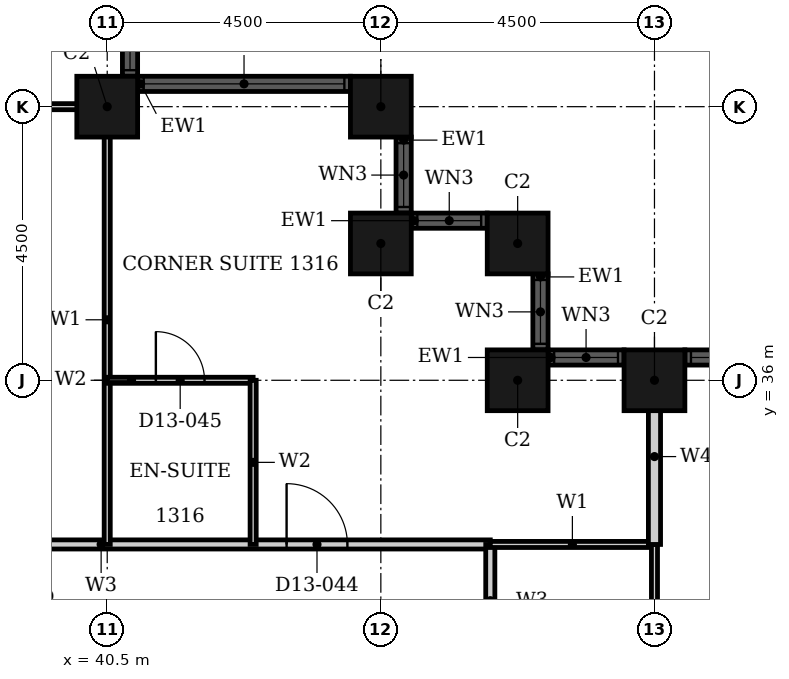
"""IFC4 building model, lengths in metres.
Left out: names, types, materials, properties, quantities, classifications, styles, units other than length and angle.
Written with IfcOpenShell. Run it as: python <this file> out.ifc"""

import sys

from ifc_helpers import new_model, si_unit, direction, frame, frame_2d, origin, origin_2d, place, context, subcontext, project, spatial, rectangle, hollow_rectangle, extrude, element, fill, save


model = new_model("IFC4")
c1 = context("Model", 3, precision=1e-05, world=origin(), true_north=direction((0.0, 1.0)))
c2 = subcontext(c1, "Body", "Model", "MODEL_VIEW")
j1 = project(units=[si_unit("LENGTHUNIT", "METRE"), si_unit("PLANEANGLEUNIT", "RADIAN")], contexts=[c1])
p1 = place(None, origin())
s1 = spatial("IfcSite", under=j1, at=p1, CompositionType="ELEMENT")
p2 = place(p1, origin())
s2 = spatial("IfcBuilding", under=s1, at=p2, CompositionType="ELEMENT")
p3 = place(p2, frame((0.0, 0.0, 60.0)))
s3 = spatial("IfcBuildingStorey", under=s2, at=p3, CompositionType="ELEMENT", Elevation=60.0)
for number, where, z_axis, x_axis in (
    (1, (49.5, 36.0, 0.0), (0.0, 0.0, 1.0), (1.0, 0.0, 0.0)),
    (2, (47.25, 36.0, 0.0), (0.0, 0.0, 1.0), (1.0, 0.0, 0.0)),
    (3, (47.25, 38.25, 0.0), (0.0, 0.0, 1.0), (1.0, 0.0, 0.0)),
    (4, (45.0, 38.25, 0.0), (0.0, 0.0, 1.0), (1.0, 0.0, 0.0)),
    (5, (45.0, 40.5, 0.0), (0.0, 0.0, 1.0), (1.0, 0.0, 0.0)),
    (6, (40.5, 40.5, 0.0), (0.0, 0.0, 1.0), (1.0, 0.0, 0.0)),
):
    element("IfcColumn", number, at=place(p3, frame(where, z_axis=z_axis, x_axis=x_axis)), inside=s3, PredefinedType="COLUMN", context=c2, shape_type="SweptSolid", body=[
        extrude(hollow_rectangle(XDim=1.0, YDim=1.0, WallThickness=0.032, at=origin_2d()), origin(), (0.0, 0.0, 1.0), 3.6),
    ])
p4 = place(p3, frame((58.0, 36.375, 0.0), z_axis=(0.0, 0.0, 1.0), x_axis=(-1.0, 0.0, 0.0)))
e7 = element("IfcWall", 7, at=p4, inside=s3, PredefinedType="SOLIDWALL", context=c2, shape_type="SweptSolid", body=[
    extrude(rectangle(XDim=8.0, YDim=0.25, at=frame_2d((4.0, 0.0))), origin(), (0.0, 0.0, 1.0), 3.6),
])
p5 = place(p4, frame((0.1, 0.0, 0.9)))
e8 = element("IfcOpeningElement", 8, at=p5, cuts=e7, PredefinedType="OPENING", context=c2, shape_type="SweptSolid", body=[
    extrude(rectangle(XDim=3.3, YDim=2.08, at=frame_2d((1.65, 1.04))), frame((0.0, 0.135, 0.0), z_axis=(0.0, -1.0, 0.0), x_axis=(1.0, 0.0, 0.0)), (0.0, 0.0, 1.0), 0.27),
])
p6 = place(p4, frame((4.6, 0.0, 0.9)))
e9 = element("IfcOpeningElement", 9, at=p6, cuts=e7, PredefinedType="OPENING", context=c2, shape_type="SweptSolid", body=[
    extrude(rectangle(XDim=3.3, YDim=2.08, at=frame_2d((1.65, 1.04))), frame((0.0, 0.135, 0.0), z_axis=(0.0, -1.0, 0.0), x_axis=(1.0, 0.0, 0.0)), (0.0, 0.0, 1.0), 0.27),
])
p7 = place(p3, frame((49.0, 36.375, 0.0), z_axis=(0.0, 0.0, 1.0), x_axis=(-1.0, 0.0, 0.0)))
e10 = element("IfcWall", 10, at=p7, inside=s3, PredefinedType="SOLIDWALL", context=c2, shape_type="SweptSolid", body=[
    extrude(rectangle(XDim=1.25, YDim=0.25, at=frame_2d((0.625, 0.0))), origin(), (0.0, 0.0, 1.0), 3.6),
])
p8 = place(p7, frame((0.1, 0.0, 0.9)))
e11 = element("IfcOpeningElement", 11, at=p8, cuts=e10, PredefinedType="OPENING", context=c2, shape_type="SweptSolid", body=[
    extrude(rectangle(XDim=1.05, YDim=2.08, at=frame_2d((0.525, 1.04))), frame((0.0, 0.135, 0.0), z_axis=(0.0, -1.0, 0.0), x_axis=(1.0, 0.0, 0.0)), (0.0, 0.0, 1.0), 0.27),
])
p9 = place(p3, frame((47.625, 36.5, 0.0), z_axis=(0.0, 0.0, 1.0), x_axis=(0.0, 1.0, 0.0)))
e12 = element("IfcWall", 12, at=p9, inside=s3, PredefinedType="SOLIDWALL", context=c2, shape_type="SweptSolid", body=[
    extrude(rectangle(XDim=1.25, YDim=0.25, at=frame_2d((0.625, 0.0))), origin(), (0.0, 0.0, 1.0), 3.6),
])
p10 = place(p9, frame((0.1, 0.0, 0.9)))
e13 = element("IfcOpeningElement", 13, at=p10, cuts=e12, PredefinedType="OPENING", context=c2, shape_type="SweptSolid", body=[
    extrude(rectangle(XDim=1.05, YDim=2.08, at=frame_2d((0.525, 1.04))), frame((0.0, 0.135, 0.0), z_axis=(0.0, -1.0, 0.0), x_axis=(1.0, 0.0, 0.0)), (0.0, 0.0, 1.0), 0.27),
])
p11 = place(p3, frame((46.75, 38.625, 0.0), z_axis=(0.0, 0.0, 1.0), x_axis=(-1.0, 0.0, 0.0)))
e14 = element("IfcWall", 14, at=p11, inside=s3, PredefinedType="SOLIDWALL", context=c2, shape_type="SweptSolid", body=[
    extrude(rectangle(XDim=1.25, YDim=0.25, at=frame_2d((0.625, 0.0))), origin(), (0.0, 0.0, 1.0), 3.6),
])
p12 = place(p11, frame((0.1, 0.0, 0.9)))
e15 = element("IfcOpeningElement", 15, at=p12, cuts=e14, PredefinedType="OPENING", context=c2, shape_type="SweptSolid", body=[
    extrude(rectangle(XDim=1.05, YDim=2.08, at=frame_2d((0.525, 1.04))), frame((0.0, 0.135, 0.0), z_axis=(0.0, -1.0, 0.0), x_axis=(1.0, 0.0, 0.0)), (0.0, 0.0, 1.0), 0.27),
])
p13 = place(p3, frame((45.375, 38.75, 0.0), z_axis=(0.0, 0.0, 1.0), x_axis=(0.0, 1.0, 0.0)))
e16 = element("IfcWall", 16, at=p13, inside=s3, PredefinedType="SOLIDWALL", context=c2, shape_type="SweptSolid", body=[
    extrude(rectangle(XDim=1.25, YDim=0.25, at=frame_2d((0.625, 0.0))), origin(), (0.0, 0.0, 1.0), 3.6),
])
p14 = place(p13, frame((0.1, 0.0, 0.9)))
e17 = element("IfcOpeningElement", 17, at=p14, cuts=e16, PredefinedType="OPENING", context=c2, shape_type="SweptSolid", body=[
    extrude(rectangle(XDim=1.05, YDim=2.08, at=frame_2d((0.525, 1.04))), frame((0.0, 0.135, 0.0), z_axis=(0.0, -1.0, 0.0), x_axis=(1.0, 0.0, 0.0)), (0.0, 0.0, 1.0), 0.27),
])
p15 = place(p3, frame((44.5, 40.875, 0.0), z_axis=(0.0, 0.0, 1.0), x_axis=(-1.0, 0.0, 0.0)))
e18 = element("IfcWall", 18, at=p15, inside=s3, PredefinedType="SOLIDWALL", context=c2, shape_type="SweptSolid", body=[
    extrude(rectangle(XDim=3.5, YDim=0.25, at=frame_2d((1.75, 0.0))), origin(), (0.0, 0.0, 1.0), 3.6),
])
p16 = place(p15, frame((0.1, 0.0, 0.9)))
e19 = element("IfcOpeningElement", 19, at=p16, cuts=e18, PredefinedType="OPENING", context=c2, shape_type="SweptSolid", body=[
    extrude(rectangle(XDim=3.3, YDim=2.08, at=frame_2d((1.65, 1.04))), frame((0.0, 0.135, 0.0), z_axis=(0.0, -1.0, 0.0), x_axis=(1.0, 0.0, 0.0)), (0.0, 0.0, 1.0), 0.27),
])
p17 = place(p3, frame((40.875, 41.0, 0.0), z_axis=(0.0, 0.0, 1.0), x_axis=(0.0, 1.0, 0.0)))
e20 = element("IfcWall", 20, at=p17, inside=s3, PredefinedType="SOLIDWALL", context=c2, shape_type="SweptSolid", body=[
    extrude(rectangle(XDim=8.0, YDim=0.25, at=frame_2d((4.0, 0.0))), origin(), (0.0, 0.0, 1.0), 3.6),
])
p18 = place(p17, frame((0.1, 0.0, 0.9)))
e21 = element("IfcOpeningElement", 21, at=p18, cuts=e20, PredefinedType="OPENING", context=c2, shape_type="SweptSolid", body=[
    extrude(rectangle(XDim=3.3, YDim=2.08, at=frame_2d((1.65, 1.04))), frame((0.0, 0.135, 0.0), z_axis=(0.0, -1.0, 0.0), x_axis=(1.0, 0.0, 0.0)), (0.0, 0.0, 1.0), 0.27),
])
p19 = place(p17, frame((4.6, 0.0, 0.9)))
e22 = element("IfcOpeningElement", 22, at=p19, cuts=e20, PredefinedType="OPENING", context=c2, shape_type="SweptSolid", body=[
    extrude(rectangle(XDim=3.3, YDim=2.08, at=frame_2d((1.65, 1.04))), frame((0.0, 0.135, 0.0), z_axis=(0.0, -1.0, 0.0), x_axis=(1.0, 0.0, 0.0)), (0.0, 0.0, 1.0), 0.27),
])
p20 = place(p3, frame((33.3, 33.3, 0.0), z_axis=(0.0, 0.0, 1.0), x_axis=(1.0, 0.0, 0.0)))
e23 = element("IfcWall", 23, at=p20, inside=s3, PredefinedType="PARTITIONING", context=c2, shape_type="SweptSolid", body=[
    extrude(rectangle(XDim=13.5, YDim=0.15, at=frame_2d((6.75, 0.0))), origin(), (0.0, 0.0, 1.0), 3.3),
])
p21 = place(p20, frame((10.15, 0.0, 0.0)))
e24 = element("IfcOpeningElement", 24, at=p21, cuts=e23, PredefinedType="OPENING", context=c2, shape_type="SweptSolid", body=[
    extrude(rectangle(XDim=1.0, YDim=2.1, at=frame_2d((0.5, 1.05))), frame((0.0, 0.085, 0.0), z_axis=(0.0, -1.0, 0.0), x_axis=(1.0, 0.0, 0.0)), (0.0, 0.0, 1.0), 0.17),
])
p22 = place(p20, frame((3.15, 0.0, 0.0)))
e25 = element("IfcOpeningElement", 25, at=p22, cuts=e23, PredefinedType="OPENING", context=c2, shape_type="SweptSolid", body=[
    extrude(rectangle(XDim=0.9, YDim=2.1, at=frame_2d((0.45, 1.05))), frame((0.0, 0.085, 0.0), z_axis=(0.0, -1.0, 0.0), x_axis=(1.0, 0.0, 0.0)), (0.0, 0.0, 1.0), 0.17),
])
p23 = place(p3, frame((46.8, 28.8, 0.0), z_axis=(0.0, 0.0, 1.0), x_axis=(0.0, 1.0, 0.0)))
e26 = element("IfcWall", 26, at=p23, inside=s3, PredefinedType="PARTITIONING", context=c2, shape_type="SweptSolid", body=[
    extrude(rectangle(XDim=4.5, YDim=0.15, at=frame_2d((2.25, 0.0))), origin(), (0.0, 0.0, 1.0), 3.3),
])
p24 = place(p23, frame((1.75, 0.0, 0.0)))
e27 = element("IfcOpeningElement", 27, at=p24, cuts=e26, PredefinedType="OPENING", context=c2, shape_type="SweptSolid", body=[
    extrude(rectangle(XDim=0.9, YDim=2.1, at=frame_2d((0.45, 1.05))), frame((0.0, 0.085, 0.0), z_axis=(0.0, -1.0, 0.0), x_axis=(1.0, 0.0, 0.0)), (0.0, 0.0, 1.0), 0.17),
])
p25 = place(p3, frame((46.8, 33.3, 0.0), z_axis=(0.0, 0.0, 1.0), x_axis=(1.0, 0.0, 0.0)))
e28 = element("IfcWall", 28, at=p25, inside=s3, PredefinedType="PARTITIONING", context=c2, shape_type="SweptSolid", body=[
    extrude(rectangle(XDim=2.7, YDim=0.1, at=frame_2d((1.35, 0.0))), origin(), (0.0, 0.0, 1.0), 3.3),
])
p26 = place(p3, frame((33.3, 40.5, 0.0), z_axis=(0.0, 0.0, 1.0), x_axis=(1.0, 0.0, 0.0)))
e29 = element("IfcWall", 29, at=p26, inside=s3, PredefinedType="PARTITIONING", context=c2, shape_type="SweptSolid", body=[
    extrude(rectangle(XDim=7.39, YDim=0.1, at=frame_2d((3.695, 0.0))), origin(), (0.0, 0.0, 1.0), 2.38),
])
p27 = place(p3, frame((40.5, 33.3, 0.0), z_axis=(0.0, 0.0, 1.0), x_axis=(0.0, 1.0, 0.0)))
e30 = element("IfcWall", 30, at=p27, inside=s3, PredefinedType="PARTITIONING", context=c2, shape_type="SweptSolid", body=[
    extrude(rectangle(XDim=7.39, YDim=0.1, at=frame_2d((3.695, 0.0))), origin(), (0.0, 0.0, 1.0), 3.3),
])
p28 = place(p3, frame((49.5, 28.8, 0.0), z_axis=(0.0, 0.0, 1.0), x_axis=(0.0, 1.0, 0.0)))
e31 = element("IfcWall", 31, at=p28, inside=s3, PredefinedType="PARTITIONING", context=c2, shape_type="SweptSolid", body=[
    extrude(rectangle(XDim=4.5, YDim=0.1, at=frame_2d((2.25, 0.0))), origin(), (0.0, 0.0, 1.0), 2.38),
])
p29 = place(p3, frame((49.5, 33.3, 0.0), z_axis=(0.0, 0.0, 1.0), x_axis=(0.0, 1.0, 0.0)))
e32 = element("IfcWall", 32, at=p29, inside=s3, PredefinedType="PARTITIONING", context=c2, shape_type="SweptSolid", body=[
    extrude(rectangle(XDim=2.89, YDim=0.2, at=frame_2d((1.445, 0.0))), origin(), (0.0, 0.0, 1.0), 2.38),
])
p30 = place(p3, frame((40.5, 36.0, 0.0), z_axis=(0.0, 0.0, 1.0), x_axis=(1.0, 0.0, 0.0)))
e33 = element("IfcWall", 33, at=p30, inside=s3, PredefinedType="PARTITIONING", context=c2, shape_type="SweptSolid", body=[
    extrude(rectangle(XDim=2.4, YDim=0.1, at=frame_2d((1.2, 0.0))), origin(), (0.0, 0.0, 1.0), 3.3),
])
p31 = place(p30, frame((0.8, 0.0, 0.0)))
e34 = element("IfcOpeningElement", 34, at=p31, cuts=e33, PredefinedType="OPENING", context=c2, shape_type="SweptSolid", body=[
    extrude(rectangle(XDim=0.8, YDim=2.1, at=frame_2d((0.4, 1.05))), frame((0.0, 0.06, 0.0), z_axis=(0.0, -1.0, 0.0), x_axis=(1.0, 0.0, 0.0)), (0.0, 0.0, 1.0), 0.12),
])
p32 = place(p3, frame((42.9, 33.3, 0.0), z_axis=(0.0, 0.0, 1.0), x_axis=(0.0, 1.0, 0.0)))
e35 = element("IfcWall", 35, at=p32, inside=s3, PredefinedType="PARTITIONING", context=c2, shape_type="SweptSolid", body=[
    extrude(rectangle(XDim=2.7, YDim=0.1, at=frame_2d((1.35, 0.0))), origin(), (0.0, 0.0, 1.0), 3.3),
])
p33 = place(p6, origin())
e36 = element("IfcWindow", 36, at=p33, inside=s3, PartitioningType="SINGLE_PANEL", PredefinedType="WINDOW", context=c2, shape_type="SweptSolid", body=[
    extrude(rectangle(XDim=3.3, YDim=2.08, at=frame_2d((1.65, 1.04))), frame((0.0, 0.03, 0.0), z_axis=(0.0, -1.0, 0.0), x_axis=(1.0, 0.0, 0.0)), (0.0, 0.0, 1.0), 0.06),
])
fill(e9, e36)
p34 = place(p8, origin())
e37 = element("IfcWindow", 37, at=p34, inside=s3, PartitioningType="SINGLE_PANEL", PredefinedType="WINDOW", context=c2, shape_type="SweptSolid", body=[
    extrude(rectangle(XDim=1.05, YDim=2.08, at=frame_2d((0.525, 1.04))), frame((0.0, 0.03, 0.0), z_axis=(0.0, -1.0, 0.0), x_axis=(1.0, 0.0, 0.0)), (0.0, 0.0, 1.0), 0.06),
])
fill(e11, e37)
p35 = place(p10, origin())
e38 = element("IfcWindow", 38, at=p35, inside=s3, PartitioningType="SINGLE_PANEL", PredefinedType="WINDOW", context=c2, shape_type="SweptSolid", body=[
    extrude(rectangle(XDim=1.05, YDim=2.08, at=frame_2d((0.525, 1.04))), frame((0.0, 0.03, 0.0), z_axis=(0.0, -1.0, 0.0), x_axis=(1.0, 0.0, 0.0)), (0.0, 0.0, 1.0), 0.06),
])
fill(e13, e38)
p36 = place(p12, origin())
e39 = element("IfcWindow", 39, at=p36, inside=s3, PartitioningType="SINGLE_PANEL", PredefinedType="WINDOW", context=c2, shape_type="SweptSolid", body=[
    extrude(rectangle(XDim=1.05, YDim=2.08, at=frame_2d((0.525, 1.04))), frame((0.0, 0.03, 0.0), z_axis=(0.0, -1.0, 0.0), x_axis=(1.0, 0.0, 0.0)), (0.0, 0.0, 1.0), 0.06),
])
fill(e15, e39)
p37 = place(p14, origin())
e40 = element("IfcWindow", 40, at=p37, inside=s3, PartitioningType="SINGLE_PANEL", PredefinedType="WINDOW", context=c2, shape_type="SweptSolid", body=[
    extrude(rectangle(XDim=1.05, YDim=2.08, at=frame_2d((0.525, 1.04))), frame((0.0, 0.03, 0.0), z_axis=(0.0, -1.0, 0.0), x_axis=(1.0, 0.0, 0.0)), (0.0, 0.0, 1.0), 0.06),
])
fill(e17, e40)
p38 = place(p16, origin())
e41 = element("IfcWindow", 41, at=p38, inside=s3, PartitioningType="SINGLE_PANEL", PredefinedType="WINDOW", context=c2, shape_type="SweptSolid", body=[
    extrude(rectangle(XDim=3.3, YDim=2.08, at=frame_2d((1.65, 1.04))), frame((0.0, 0.03, 0.0), z_axis=(0.0, -1.0, 0.0), x_axis=(1.0, 0.0, 0.0)), (0.0, 0.0, 1.0), 0.06),
])
fill(e19, e41)
p39 = place(p18, origin())
e42 = element("IfcWindow", 42, at=p39, inside=s3, PartitioningType="SINGLE_PANEL", PredefinedType="WINDOW", context=c2, shape_type="SweptSolid", body=[
    extrude(rectangle(XDim=3.3, YDim=2.08, at=frame_2d((1.65, 1.04))), frame((0.0, 0.03, 0.0), z_axis=(0.0, -1.0, 0.0), x_axis=(1.0, 0.0, 0.0)), (0.0, 0.0, 1.0), 0.06),
])
fill(e21, e42)
p40 = place(p21, origin())
e43 = element("IfcDoor", 43, at=p40, inside=s3, OperationType="SINGLE_SWING_RIGHT", PredefinedType="DOOR", context=c2, shape_type="SweptSolid", body=[
    extrude(rectangle(XDim=1.0, YDim=2.1, at=frame_2d((0.5, 1.05))), frame((0.0, 0.025, 0.0), z_axis=(0.0, -1.0, 0.0), x_axis=(1.0, 0.0, 0.0)), (0.0, 0.0, 1.0), 0.05),
])
fill(e24, e43)
p41 = place(p31, origin())
e44 = element("IfcDoor", 44, at=p41, inside=s3, OperationType="SINGLE_SWING_RIGHT", PredefinedType="DOOR", context=c2, shape_type="SweptSolid", body=[
    extrude(rectangle(XDim=0.8, YDim=2.1, at=frame_2d((0.4, 1.05))), frame((0.0, 0.025, 0.0), z_axis=(0.0, -1.0, 0.0), x_axis=(1.0, 0.0, 0.0)), (0.0, 0.0, 1.0), 0.05),
])
fill(e34, e44)
save(model, sys.argv[1])
